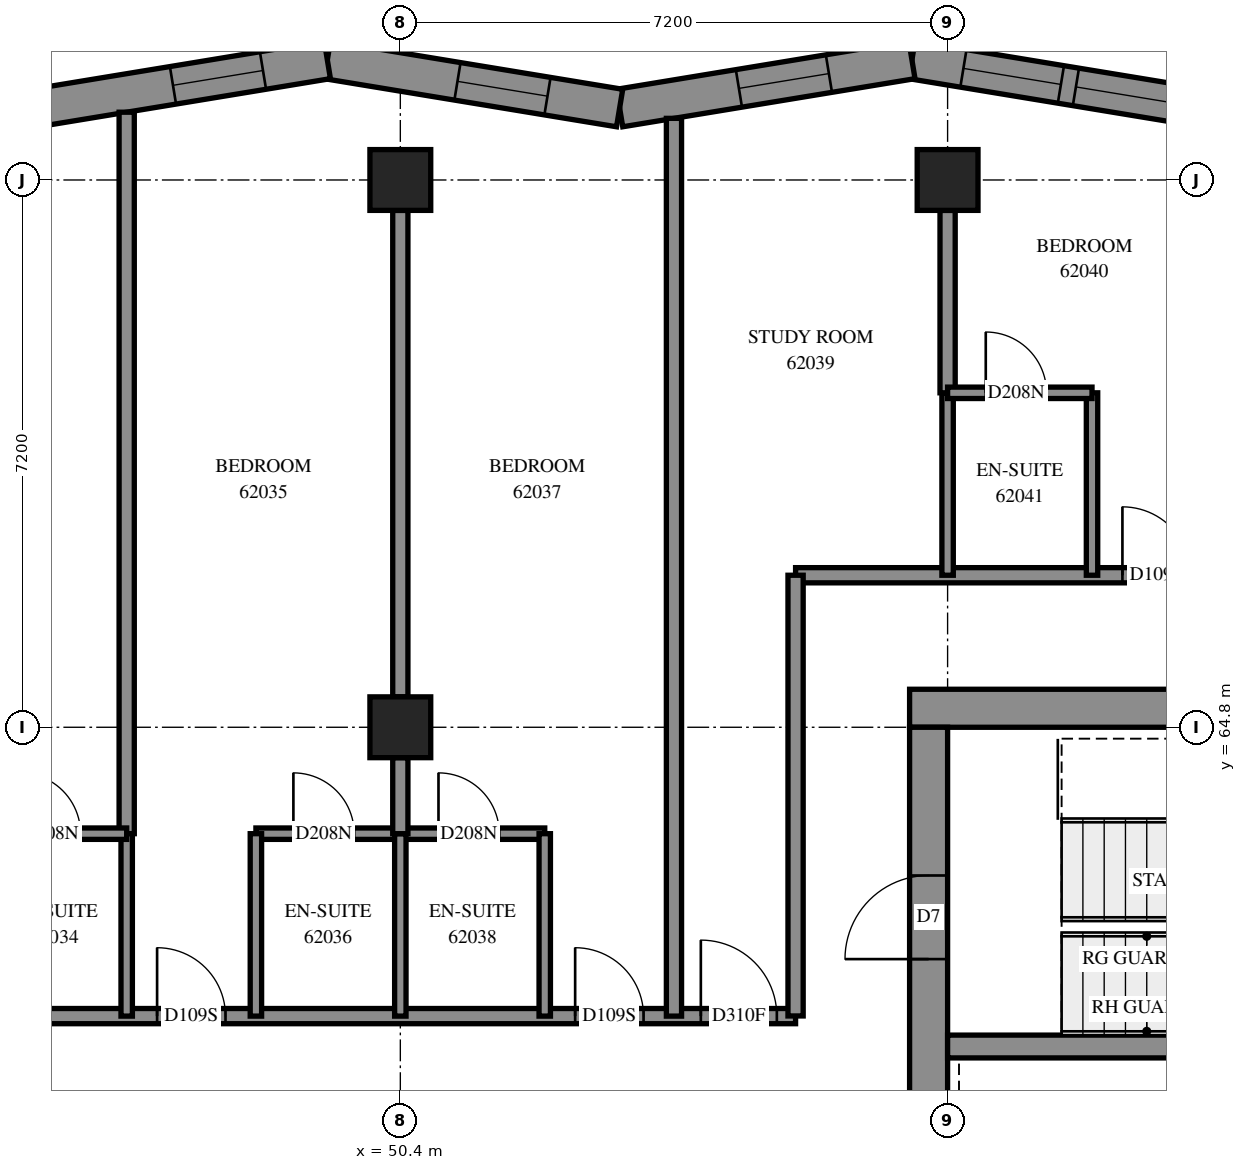
"""IFC4 building model, lengths in metres.
Left out: names, types, materials, properties, quantities, classifications, styles, units other than length and angle.
Written with IfcOpenShell. Run it as: python <this file> out.ifc"""

import sys

from ifc_helpers import new_model, si_unit, direction, frame, frame_2d, origin, origin_2d, place, context, subcontext, project, spatial, polyline, rectangle, outline, extrude, element, fill, save


model = new_model("IFC4")
c1 = context("Model", 3, precision=1e-05, world=origin(), true_north=direction((0.0, 1.0)))
c2 = subcontext(c1, "Body", "Model", "MODEL_VIEW")
j1 = project(units=[si_unit("LENGTHUNIT", "METRE"), si_unit("PLANEANGLEUNIT", "RADIAN")], contexts=[c1])
p1 = place(None, origin())
s1 = spatial("IfcSite", under=j1, at=p1, CompositionType="ELEMENT")
p2 = place(p1, origin())
s2 = spatial("IfcBuilding", under=s1, at=p2, CompositionType="ELEMENT")
p3 = place(p2, frame((0.0, 0.0, 227.0)))
s3 = spatial("IfcBuildingStorey", under=s2, at=p3, CompositionType="ELEMENT", Elevation=227.0)
for number, where, z_axis, x_axis in (
    (1, (50.4, 64.8, 0.0), (0.0, 0.0, 1.0), (1.0, 0.0, 0.0)),
    (2, (50.4, 72.0, 0.0), (0.0, 0.0, 1.0), (1.0, 0.0, 0.0)),
    (3, (57.6, 72.0, 0.0), (0.0, 0.0, 1.0), (1.0, 0.0, 0.0)),
):
    element("IfcColumn", number, at=place(p3, frame(where, z_axis=z_axis, x_axis=x_axis)), inside=s3, PredefinedType="COLUMN", context=c2, shape_type="SweptSolid", body=[
        extrude(rectangle(XDim=0.8, YDim=0.8, at=origin_2d()), origin(), (0.0, 0.0, 1.0), 3.1),
    ])
p4 = place(p3, frame((57.1, 65.05, -0.3), z_axis=(0.0, 0.0, 1.0), x_axis=(1.0, 0.0, 0.0)))
e4 = element("IfcWall", 4, at=p4, inside=s3, PredefinedType="SHEAR", context=c2, shape_type="SweptSolid", body=[
    extrude(rectangle(XDim=15.4, YDim=0.5, at=frame_2d((7.7, 0.0))), origin(), (0.0, 0.0, 1.0), 2.7),
])
p5 = place(p4, frame((10.5, 0.0, 0.3)))
e5 = element("IfcOpeningElement", 5, at=p5, cuts=e4, PredefinedType="OPENING", context=c2, shape_type="SweptSolid", body=[
    extrude(rectangle(XDim=0.8, YDim=2.1, at=frame_2d((0.4, 1.05))), frame((0.0, 0.26, 0.0), z_axis=(0.0, -1.0, 0.0), x_axis=(1.0, 0.0, 0.0)), (0.0, 0.0, 1.0), 0.52),
])
p6 = place(p3, frame((57.35, 50.4, -0.3), z_axis=(0.0, 0.0, 1.0), x_axis=(0.0, 1.0, 0.0)))
e6 = element("IfcWall", 6, at=p6, inside=s3, PredefinedType="SHEAR", context=c2, shape_type="SweptSolid", body=[
    extrude(rectangle(XDim=14.4, YDim=0.5, at=frame_2d((7.2, 0.0))), origin(), (0.0, 0.0, 1.0), 2.7),
])
p7 = place(p6, frame((4.55, 0.0, 0.3)))
e7 = element("IfcOpeningElement", 7, at=p7, cuts=e6, PredefinedType="OPENING", context=c2, shape_type="SweptSolid", body=[
    extrude(rectangle(XDim=1.1, YDim=2.1, at=frame_2d((0.55, 1.05))), frame((0.0, 0.26, 0.0), z_axis=(0.0, -1.0, 0.0), x_axis=(1.0, 0.0, 0.0)), (0.0, 0.0, 1.0), 0.52),
])
p8 = place(p6, frame((11.35, 0.0, 0.3)))
e8 = element("IfcOpeningElement", 8, at=p8, cuts=e6, PredefinedType="OPENING", context=c2, shape_type="SweptSolid", body=[
    extrude(rectangle(XDim=1.1, YDim=2.1, at=frame_2d((0.55, 1.05))), frame((0.0, 0.26, 0.0), z_axis=(0.0, -1.0, 0.0), x_axis=(1.0, 0.0, 0.0)), (0.0, 0.0, 1.0), 0.52),
])
p9 = place(p3, frame((57.6, 60.6, 0.0), z_axis=(0.0, 0.0, 1.0), x_axis=(1.0, 0.0, 0.0)))
e9 = element("IfcWall", 9, at=p9, inside=s3, PredefinedType="SOLIDWALL", context=c2, shape_type="SweptSolid", body=[
    extrude(rectangle(XDim=7.2, YDim=0.3, at=frame_2d((3.6, 0.0))), origin(), (0.0, 0.0, 1.0), 3.1),
])
p10 = place(p3, frame((60.976, 72.947, 0.0), z_axis=(0.0, 0.0, 1.0), x_axis=(-0.9867206744, 0.1624263241, 0.0)))
e10 = element("IfcWall", 10, at=p10, inside=s3, PredefinedType="SOLIDWALL", context=c2, shape_type="SweptSolid", body=[
    extrude(outline(polyline([(0.041, -0.25), (3.938, -0.25), (3.856, 0.25), (-0.041, 0.25), (0.041, -0.25)])), origin(), (0.0, 0.0, 1.0), 3.1),
])
p11 = place(p10, frame((0.411, 0.0, 0.45)))
e11 = element("IfcOpeningElement", 11, at=p11, cuts=e10, PredefinedType="OPENING", context=c2, shape_type="SweptSolid", body=[
    extrude(rectangle(XDim=1.3, YDim=2.5, at=frame_2d((0.65, 1.25))), frame((0.0, 0.26, 0.0), z_axis=(0.0, -1.0, 0.0), x_axis=(1.0, 0.0, 0.0)), (0.0, 0.0, 1.0), 0.52),
])
p12 = place(p10, frame((1.911, 0.0, 0.45)))
e12 = element("IfcOpeningElement", 12, at=p12, cuts=e10, PredefinedType="OPENING", context=c2, shape_type="SweptSolid", body=[
    extrude(rectangle(XDim=1.3, YDim=2.5, at=frame_2d((0.65, 1.25))), frame((0.0, 0.26, 0.0), z_axis=(0.0, -1.0, 0.0), x_axis=(1.0, 0.0, 0.0)), (0.0, 0.0, 1.0), 0.52),
])
p13 = place(p3, frame((57.131, 73.58, 0.0), z_axis=(0.0, 0.0, 1.0), x_axis=(-0.9867213513, -0.1624222118, 0.0)))
e13 = element("IfcWall", 13, at=p13, inside=s3, PredefinedType="SOLIDWALL", context=c2, shape_type="SweptSolid", body=[
    extrude(outline(polyline([(-0.041, -0.25), (3.856, -0.25), (3.938, 0.25), (0.041, 0.25), (-0.041, -0.25)])), origin(), (0.0, 0.0, 1.0), 3.1),
])
p14 = place(p13, frame((1.107, 0.0, 0.45)))
e14 = element("IfcOpeningElement", 14, at=p14, cuts=e13, PredefinedType="OPENING", context=c2, shape_type="SweptSolid", body=[
    extrude(rectangle(XDim=1.2, YDim=2.5, at=frame_2d((0.6, 1.25))), frame((0.0, 0.26, 0.0), z_axis=(0.0, -1.0, 0.0), x_axis=(1.0, 0.0, 0.0)), (0.0, 0.0, 1.0), 0.52),
])
p15 = place(p3, frame((53.285, 72.947, 0.0), z_axis=(0.0, 0.0, 1.0), x_axis=(-0.9867213513, 0.1624222118, 0.0)))
e15 = element("IfcWall", 15, at=p15, inside=s3, PredefinedType="SOLIDWALL", context=c2, shape_type="SweptSolid", body=[
    extrude(outline(polyline([(0.041, -0.25), (3.938, -0.25), (3.856, 0.25), (-0.041, 0.25), (0.041, -0.25)])), origin(), (0.0, 0.0, 1.0), 3.1),
])
p16 = place(p15, frame((0.962, 0.0, 0.45)))
e16 = element("IfcOpeningElement", 16, at=p16, cuts=e15, PredefinedType="OPENING", context=c2, shape_type="SweptSolid", body=[
    extrude(rectangle(XDim=1.2, YDim=2.5, at=frame_2d((0.6, 1.25))), frame((0.0, 0.26, 0.0), z_axis=(0.0, -1.0, 0.0), x_axis=(1.0, 0.0, 0.0)), (0.0, 0.0, 1.0), 0.52),
])
p17 = place(p3, frame((49.44, 73.58, 0.0), z_axis=(0.0, 0.0, 1.0), x_axis=(-0.9867206744, -0.1624263241, 0.0)))
e17 = element("IfcWall", 17, at=p17, inside=s3, PredefinedType="SOLIDWALL", context=c2, shape_type="SweptSolid", body=[
    extrude(outline(polyline([(-0.041, -0.25), (3.856, -0.25), (3.938, 0.25), (0.041, 0.25), (-0.041, -0.25)])), origin(), (0.0, 0.0, 1.0), 3.1),
])
p18 = place(p17, frame((0.858, 0.0, 0.45)))
e18 = element("IfcOpeningElement", 18, at=p18, cuts=e17, PredefinedType="OPENING", context=c2, shape_type="SweptSolid", body=[
    extrude(rectangle(XDim=1.2, YDim=2.5, at=frame_2d((0.6, 1.25))), frame((0.0, 0.26, 0.0), z_axis=(0.0, -1.0, 0.0), x_axis=(1.0, 0.0, 0.0)), (0.0, 0.0, 1.0), 0.52),
])
p19 = place(p3, frame((55.6, 66.8, 0.0), z_axis=(0.0, 0.0, 1.0), x_axis=(1.0, 0.0, 0.0)))
e19 = element("IfcWall", 19, at=p19, inside=s3, PredefinedType="PARTITIONING", context=c2, shape_type="SweptSolid", body=[
    extrude(rectangle(XDim=18.4, YDim=0.2, at=frame_2d((9.2, 0.0))), origin(), (0.0, 0.0, 1.0), 3.1),
])
p20 = place(p19, frame((4.3, 0.0, 0.0)))
e20 = element("IfcOpeningElement", 20, at=p20, cuts=e19, PredefinedType="OPENING", context=c2, shape_type="SweptSolid", body=[
    extrude(rectangle(XDim=0.9, YDim=2.1, at=frame_2d((0.45, 1.05))), frame((0.0, 0.11, 0.0), z_axis=(0.0, -1.0, 0.0), x_axis=(1.0, 0.0, 0.0)), (0.0, 0.0, 1.0), 0.22),
])
p21 = place(p19, frame((6.0, 0.0, 0.0)))
e21 = element("IfcOpeningElement", 21, at=p21, cuts=e19, PredefinedType="OPENING", context=c2, shape_type="SweptSolid", body=[
    extrude(rectangle(XDim=0.9, YDim=2.1, at=frame_2d((0.45, 1.05))), frame((0.0, 0.11, 0.0), z_axis=(0.0, -1.0, 0.0), x_axis=(1.0, 0.0, 0.0)), (0.0, 0.0, 1.0), 0.22),
])
p22 = place(p19, frame((13.367, 0.0, 0.0)))
e22 = element("IfcOpeningElement", 22, at=p22, cuts=e19, PredefinedType="OPENING", context=c2, shape_type="SweptSolid", body=[
    extrude(rectangle(XDim=1.0, YDim=2.1, at=frame_2d((0.5, 1.05))), frame((0.0, 0.11, 0.0), z_axis=(0.0, -1.0, 0.0), x_axis=(1.0, 0.0, 0.0)), (0.0, 0.0, 1.0), 0.22),
])
p23 = place(p3, frame((40.602, 61.0, 0.0), z_axis=(0.0, 0.0, 1.0), x_axis=(1.0, 0.0, 0.0)))
e23 = element("IfcWall", 23, at=p23, inside=s3, PredefinedType="PARTITIONING", context=c2, shape_type="SweptSolid", body=[
    extrude(rectangle(XDim=14.998, YDim=0.2, at=frame_2d((7.499, 0.0))), origin(), (0.0, 0.0, 1.0), 3.1),
])
p24 = place(p23, frame((1.306, 0.0, 0.0)))
e24 = element("IfcOpeningElement", 24, at=p24, cuts=e23, PredefinedType="OPENING", context=c2, shape_type="SweptSolid", body=[
    extrude(rectangle(XDim=0.9, YDim=2.1, at=frame_2d((0.45, 1.05))), frame((0.0, 0.11, 0.0), z_axis=(0.0, -1.0, 0.0), x_axis=(1.0, 0.0, 0.0)), (0.0, 0.0, 1.0), 0.22),
])
p25 = place(p23, frame((6.598, 0.0, 0.0)))
e25 = element("IfcOpeningElement", 25, at=p25, cuts=e23, PredefinedType="OPENING", context=c2, shape_type="SweptSolid", body=[
    extrude(rectangle(XDim=0.9, YDim=2.1, at=frame_2d((0.45, 1.05))), frame((0.0, 0.11, 0.0), z_axis=(0.0, -1.0, 0.0), x_axis=(1.0, 0.0, 0.0)), (0.0, 0.0, 1.0), 0.22),
])
p26 = place(p23, frame((12.098, 0.0, 0.0)))
e26 = element("IfcOpeningElement", 26, at=p26, cuts=e23, PredefinedType="OPENING", context=c2, shape_type="SweptSolid", body=[
    extrude(rectangle(XDim=0.9, YDim=2.1, at=frame_2d((0.45, 1.05))), frame((0.0, 0.11, 0.0), z_axis=(0.0, -1.0, 0.0), x_axis=(1.0, 0.0, 0.0)), (0.0, 0.0, 1.0), 0.22),
])
p27 = place(p23, frame((13.752, 0.0, 0.0)))
e27 = element("IfcOpeningElement", 27, at=p27, cuts=e23, PredefinedType="OPENING", context=c2, shape_type="SweptSolid", body=[
    extrude(rectangle(XDim=1.0, YDim=2.1, at=frame_2d((0.5, 1.05))), frame((0.0, 0.11, 0.0), z_axis=(0.0, -1.0, 0.0), x_axis=(1.0, 0.0, 0.0)), (0.0, 0.0, 1.0), 0.22),
])
p28 = place(p3, frame((54.0, 61.0, 0.0), z_axis=(0.0, 0.0, 1.0), x_axis=(0.0, 1.0, 0.0)))
e28 = element("IfcWall", 28, at=p28, inside=s3, PredefinedType="PARTITIONING", context=c2, shape_type="SweptSolid", body=[
    extrude(rectangle(XDim=11.811, YDim=0.2, at=frame_2d((5.905, 0.0))), origin(), (0.0, 0.0, 1.0), 3.1),
])
p29 = place(p3, frame((46.8, 63.4, 0.0), z_axis=(0.0, 0.0, 1.0), x_axis=(0.0, 1.0, 0.0)))
e29 = element("IfcWall", 29, at=p29, inside=s3, PredefinedType="PARTITIONING", context=c2, shape_type="SweptSolid", body=[
    extrude(rectangle(XDim=9.492, YDim=0.2, at=frame_2d((4.746, 0.0))), origin(), (0.0, 0.0, 1.0), 3.1),
])
p30 = place(p3, frame((50.4, 65.2, 0.0), z_axis=(0.0, 0.0, 1.0), x_axis=(0.0, 1.0, 0.0)))
e30 = element("IfcWall", 30, at=p30, inside=s3, PredefinedType="PARTITIONING", context=c2, shape_type="SweptSolid", body=[
    extrude(rectangle(XDim=6.4, YDim=0.2, at=frame_2d((3.2, 0.0))), origin(), (0.0, 0.0, 1.0), 3.1),
])
p31 = place(p3, frame((55.6, 61.002, 0.0), z_axis=(0.0, 0.0, 1.0), x_axis=(0.0, 1.0, 0.0)))
e31 = element("IfcWall", 31, at=p31, inside=s3, PredefinedType="PARTITIONING", context=c2, shape_type="SweptSolid", body=[
    extrude(rectangle(XDim=5.798, YDim=0.2, at=frame_2d((2.899, 0.0))), origin(), (0.0, 0.0, 1.0), 3.1),
])
p32 = place(p3, frame((48.5, 63.4, 0.0), z_axis=(0.0, 0.0, 1.0), x_axis=(1.0, 0.0, 0.0)))
e32 = element("IfcWall", 32, at=p32, inside=s3, PredefinedType="PARTITIONING", context=c2, shape_type="SweptSolid", body=[
    extrude(rectangle(XDim=3.8, YDim=0.15, at=frame_2d((1.9, 0.0))), origin(), (0.0, 0.0, 1.0), 3.1),
])
p33 = place(p32, frame((0.493, 0.0, 0.0)))
e33 = element("IfcOpeningElement", 33, at=p33, cuts=e32, PredefinedType="OPENING", context=c2, shape_type="SweptSolid", body=[
    extrude(rectangle(XDim=0.8, YDim=2.1, at=frame_2d((0.4, 1.05))), frame((0.0, 0.085, 0.0), z_axis=(0.0, -1.0, 0.0), x_axis=(1.0, 0.0, 0.0)), (0.0, 0.0, 1.0), 0.17),
])
p34 = place(p32, frame((2.402, 0.0, 0.0)))
e34 = element("IfcOpeningElement", 34, at=p34, cuts=e32, PredefinedType="OPENING", context=c2, shape_type="SweptSolid", body=[
    extrude(rectangle(XDim=0.8, YDim=2.1, at=frame_2d((0.4, 1.05))), frame((0.0, 0.085, 0.0), z_axis=(0.0, -1.0, 0.0), x_axis=(1.0, 0.0, 0.0)), (0.0, 0.0, 1.0), 0.17),
])
for number, where, z_axis, x_axis in (
    (35, (57.6, 66.8, 0.0), (0.0, 0.0, 1.0), (0.0, 1.0, 0.0)),
    (36, (59.5, 66.8, 0.0), (0.0, 0.0, 1.0), (0.0, 1.0, 0.0)),
    (37, (46.8, 61.0, 0.0), (0.0, 0.0, 1.0), (0.0, 1.0, 0.0)),
    (38, (48.5, 61.0, 0.0), (0.0, 0.0, 1.0), (0.0, 1.0, 0.0)),
    (39, (50.4, 61.0, 0.0), (0.0, 0.0, 1.0), (0.0, 1.0, 0.0)),
    (40, (52.3, 61.0, 0.0), (0.0, 0.0, 1.0), (0.0, 1.0, 0.0)),
):
    element("IfcWall", number, at=place(p3, frame(where, z_axis=z_axis, x_axis=x_axis)), inside=s3, PredefinedType="PARTITIONING", context=c2, shape_type="SweptSolid", body=[
        extrude(rectangle(XDim=2.4, YDim=0.15, at=frame_2d((1.2, 0.0))), origin(), (0.0, 0.0, 1.0), 3.1),
    ])
p35 = place(p3, frame((57.6, 69.2, 0.0), z_axis=(0.0, 0.0, 1.0), x_axis=(0.0, 1.0, 0.0)))
e41 = element("IfcWall", 41, at=p35, inside=s3, PredefinedType="PARTITIONING", context=c2, shape_type="SweptSolid", body=[
    extrude(rectangle(XDim=2.4, YDim=0.2, at=frame_2d((1.2, 0.0))), origin(), (0.0, 0.0, 1.0), 3.1),
])
p36 = place(p3, frame((44.9, 63.4, 0.0), z_axis=(0.0, 0.0, 1.0), x_axis=(1.0, 0.0, 0.0)))
e42 = element("IfcWall", 42, at=p36, inside=s3, PredefinedType="PARTITIONING", context=c2, shape_type="SweptSolid", body=[
    extrude(rectangle(XDim=1.9, YDim=0.15, at=frame_2d((0.95, 0.0))), origin(), (0.0, 0.0, 1.0), 3.1),
])
p37 = place(p36, frame((0.493, 0.0, 0.0)))
e43 = element("IfcOpeningElement", 43, at=p37, cuts=e42, PredefinedType="OPENING", context=c2, shape_type="SweptSolid", body=[
    extrude(rectangle(XDim=0.8, YDim=2.1, at=frame_2d((0.4, 1.05))), frame((0.0, 0.085, 0.0), z_axis=(0.0, -1.0, 0.0), x_axis=(1.0, 0.0, 0.0)), (0.0, 0.0, 1.0), 0.17),
])
p38 = place(p3, frame((57.6, 69.2, 0.0), z_axis=(0.0, 0.0, 1.0), x_axis=(1.0, 0.0, 0.0)))
e44 = element("IfcWall", 44, at=p38, inside=s3, PredefinedType="PARTITIONING", context=c2, shape_type="SweptSolid", body=[
    extrude(rectangle(XDim=1.9, YDim=0.15, at=frame_2d((0.95, 0.0))), origin(), (0.0, 0.0, 1.0), 3.1),
])
p39 = place(p38, frame((0.502, 0.0, 0.0)))
e45 = element("IfcOpeningElement", 45, at=p39, cuts=e44, PredefinedType="OPENING", context=c2, shape_type="SweptSolid", body=[
    extrude(rectangle(XDim=0.8, YDim=2.1, at=frame_2d((0.4, 1.05))), frame((0.0, 0.085, 0.0), z_axis=(0.0, -1.0, 0.0), x_axis=(1.0, 0.0, 0.0)), (0.0, 0.0, 1.0), 0.17),
])
p40 = place(p3, frame((50.4, 63.4, 0.0), z_axis=(0.0, 0.0, 1.0), x_axis=(0.0, 1.0, 0.0)))
e46 = element("IfcWall", 46, at=p40, inside=s3, PredefinedType="PARTITIONING", context=c2, shape_type="SweptSolid", body=[
    extrude(rectangle(XDim=1.0, YDim=0.2, at=frame_2d((0.5, 0.0))), origin(), (0.0, 0.0, 1.0), 3.1),
])
p41 = place(p11, origin())
e47 = element("IfcWindow", 47, at=p41, inside=s3, PartitioningType="SINGLE_PANEL", PredefinedType="WINDOW", context=c2, shape_type="SweptSolid", body=[
    extrude(rectangle(XDim=1.3, YDim=2.5, at=frame_2d((0.65, 1.25))), frame((0.0, 0.18, 0.0), z_axis=(0.0, -1.0, 0.0), x_axis=(1.0, 0.0, 0.0)), (0.0, 0.0, 1.0), 0.06),
])
fill(e11, e47)
p42 = place(p12, origin())
e48 = element("IfcWindow", 48, at=p42, inside=s3, PartitioningType="SINGLE_PANEL", PredefinedType="WINDOW", context=c2, shape_type="SweptSolid", body=[
    extrude(rectangle(XDim=1.3, YDim=2.5, at=frame_2d((0.65, 1.25))), frame((0.0, 0.18, 0.0), z_axis=(0.0, -1.0, 0.0), x_axis=(1.0, 0.0, 0.0)), (0.0, 0.0, 1.0), 0.06),
])
fill(e12, e48)
p43 = place(p14, origin())
e49 = element("IfcWindow", 49, at=p43, inside=s3, PartitioningType="SINGLE_PANEL", PredefinedType="WINDOW", context=c2, shape_type="SweptSolid", body=[
    extrude(rectangle(XDim=1.2, YDim=2.5, at=frame_2d((0.6, 1.25))), frame((0.0, 0.18, 0.0), z_axis=(0.0, -1.0, 0.0), x_axis=(1.0, 0.0, 0.0)), (0.0, 0.0, 1.0), 0.06),
])
fill(e14, e49)
p44 = place(p16, origin())
e50 = element("IfcWindow", 50, at=p44, inside=s3, PartitioningType="SINGLE_PANEL", PredefinedType="WINDOW", context=c2, shape_type="SweptSolid", body=[
    extrude(rectangle(XDim=1.2, YDim=2.5, at=frame_2d((0.6, 1.25))), frame((0.0, 0.18, 0.0), z_axis=(0.0, -1.0, 0.0), x_axis=(1.0, 0.0, 0.0)), (0.0, 0.0, 1.0), 0.06),
])
fill(e16, e50)
p45 = place(p18, origin())
e51 = element("IfcWindow", 51, at=p45, inside=s3, PartitioningType="SINGLE_PANEL", PredefinedType="WINDOW", context=c2, shape_type="SweptSolid", body=[
    extrude(rectangle(XDim=1.2, YDim=2.5, at=frame_2d((0.6, 1.25))), frame((0.0, 0.18, 0.0), z_axis=(0.0, -1.0, 0.0), x_axis=(1.0, 0.0, 0.0)), (0.0, 0.0, 1.0), 0.06),
])
fill(e18, e51)
p46 = place(p8, origin())
e52 = element("IfcDoor", 52, at=p46, inside=s3, OperationType="SINGLE_SWING_LEFT", PredefinedType="DOOR", context=c2, shape_type="SweptSolid", body=[
    extrude(rectangle(XDim=1.1, YDim=2.1, at=frame_2d((0.55, 1.05))), frame((0.0, 0.025, 0.0), z_axis=(0.0, -1.0, 0.0), x_axis=(1.0, 0.0, 0.0)), (0.0, 0.0, 1.0), 0.05),
])
fill(e8, e52)
p47 = place(p37, origin())
e53 = element("IfcDoor", 53, at=p47, inside=s3, OperationType="SINGLE_SWING_RIGHT", PredefinedType="DOOR", context=c2, shape_type="SweptSolid", body=[
    extrude(rectangle(XDim=0.8, YDim=2.1, at=frame_2d((0.4, 1.05))), frame((0.0, 0.025, 0.0), z_axis=(0.0, -1.0, 0.0), x_axis=(1.0, 0.0, 0.0)), (0.0, 0.0, 1.0), 0.05),
])
fill(e43, e53)
p48 = place(p25, origin())
e54 = element("IfcDoor", 54, at=p48, inside=s3, OperationType="SINGLE_SWING_LEFT", PredefinedType="DOOR", context=c2, shape_type="SweptSolid", body=[
    extrude(rectangle(XDim=0.9, YDim=2.1, at=frame_2d((0.45, 1.05))), frame((0.0, 0.025, 0.0), z_axis=(0.0, -1.0, 0.0), x_axis=(1.0, 0.0, 0.0)), (0.0, 0.0, 1.0), 0.05),
])
fill(e25, e54)
p49 = place(p33, origin())
e55 = element("IfcDoor", 55, at=p49, inside=s3, OperationType="SINGLE_SWING_RIGHT", PredefinedType="DOOR", context=c2, shape_type="SweptSolid", body=[
    extrude(rectangle(XDim=0.8, YDim=2.1, at=frame_2d((0.4, 1.05))), frame((0.0, 0.025, 0.0), z_axis=(0.0, -1.0, 0.0), x_axis=(1.0, 0.0, 0.0)), (0.0, 0.0, 1.0), 0.05),
])
fill(e33, e55)
p50 = place(p26, origin())
e56 = element("IfcDoor", 56, at=p50, inside=s3, OperationType="SINGLE_SWING_RIGHT", PredefinedType="DOOR", context=c2, shape_type="SweptSolid", body=[
    extrude(rectangle(XDim=0.9, YDim=2.1, at=frame_2d((0.45, 1.05))), frame((0.0, 0.025, 0.0), z_axis=(0.0, -1.0, 0.0), x_axis=(1.0, 0.0, 0.0)), (0.0, 0.0, 1.0), 0.05),
])
fill(e26, e56)
p51 = place(p34, origin())
e57 = element("IfcDoor", 57, at=p51, inside=s3, OperationType="SINGLE_SWING_RIGHT", PredefinedType="DOOR", context=c2, shape_type="SweptSolid", body=[
    extrude(rectangle(XDim=0.8, YDim=2.1, at=frame_2d((0.4, 1.05))), frame((0.0, 0.025, 0.0), z_axis=(0.0, -1.0, 0.0), x_axis=(1.0, 0.0, 0.0)), (0.0, 0.0, 1.0), 0.05),
])
fill(e34, e57)
p52 = place(p27, origin())
e58 = element("IfcDoor", 58, at=p52, inside=s3, OperationType="SINGLE_SWING_LEFT", PredefinedType="DOOR", context=c2, shape_type="SweptSolid", body=[
    extrude(rectangle(XDim=1.0, YDim=2.1, at=frame_2d((0.5, 1.05))), frame((0.0, 0.025, 0.0), z_axis=(0.0, -1.0, 0.0), x_axis=(1.0, 0.0, 0.0)), (0.0, 0.0, 1.0), 0.05),
])
fill(e27, e58)
p53 = place(p20, origin())
e59 = element("IfcDoor", 59, at=p53, inside=s3, OperationType="SINGLE_SWING_RIGHT", PredefinedType="DOOR", context=c2, shape_type="SweptSolid", body=[
    extrude(rectangle(XDim=0.9, YDim=2.1, at=frame_2d((0.45, 1.05))), frame((0.0, 0.025, 0.0), z_axis=(0.0, -1.0, 0.0), x_axis=(1.0, 0.0, 0.0)), (0.0, 0.0, 1.0), 0.05),
])
fill(e20, e59)
p54 = place(p39, origin())
e60 = element("IfcDoor", 60, at=p54, inside=s3, OperationType="SINGLE_SWING_RIGHT", PredefinedType="DOOR", context=c2, shape_type="SweptSolid", body=[
    extrude(rectangle(XDim=0.8, YDim=2.1, at=frame_2d((0.4, 1.05))), frame((0.0, 0.025, 0.0), z_axis=(0.0, -1.0, 0.0), x_axis=(1.0, 0.0, 0.0)), (0.0, 0.0, 1.0), 0.05),
])
fill(e45, e60)
save(model, sys.argv[1])
